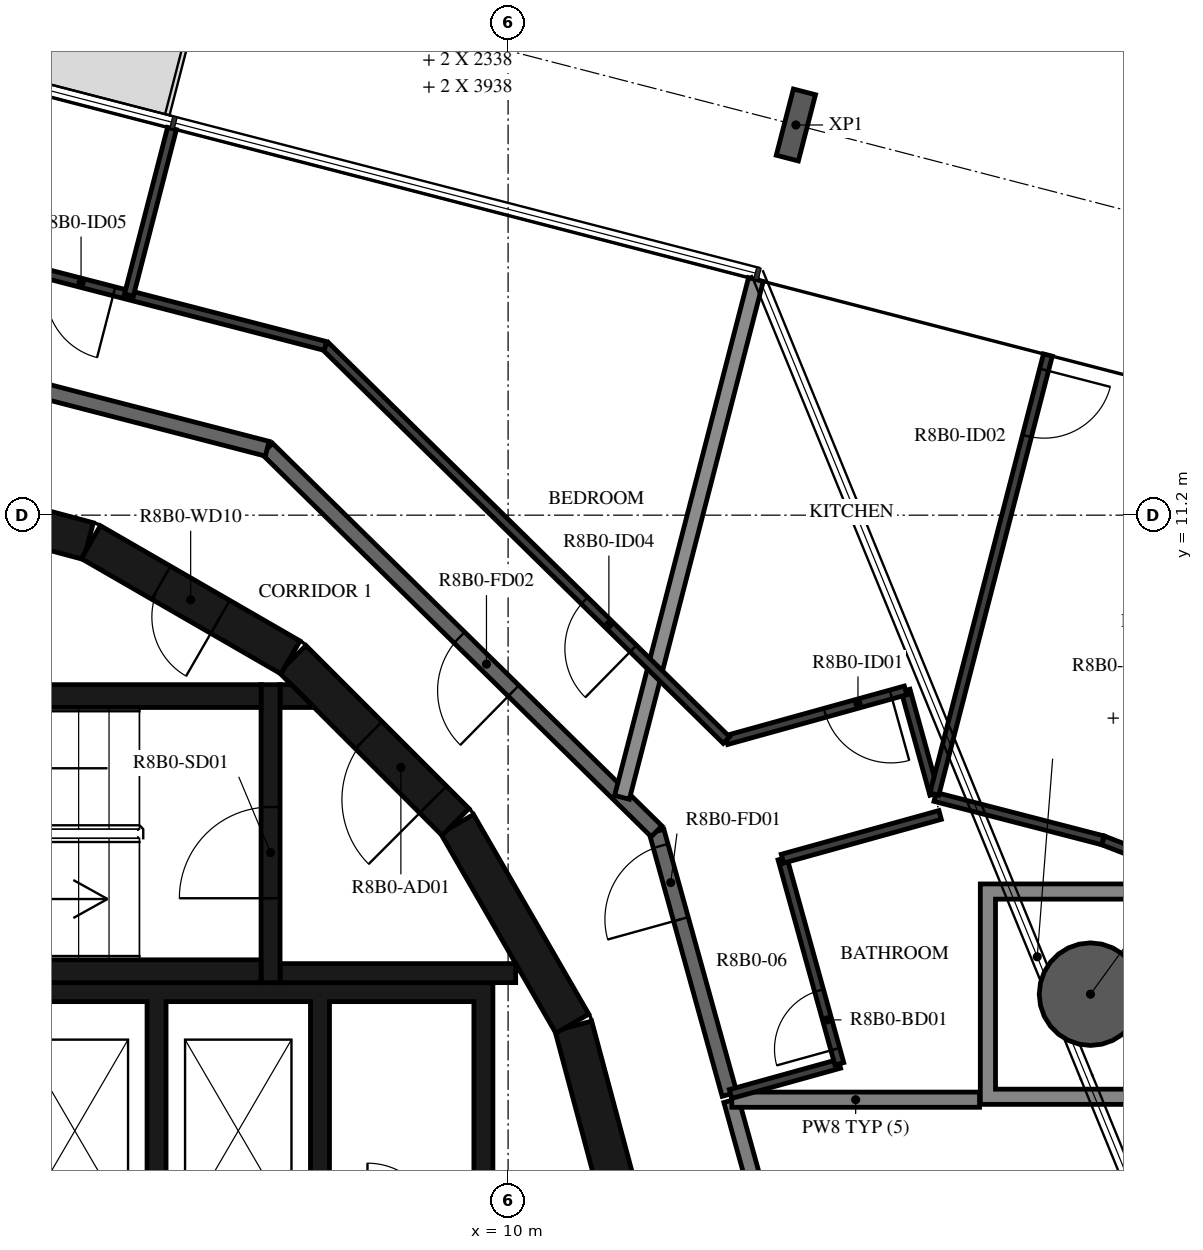
"""IFC4 building model, lengths in metres.
Left out: names, types, materials, properties, quantities, classifications, styles, units other than length and angle.
Written with IfcOpenShell. Run it as: python <this file> out.ifc"""

import sys

from ifc_helpers import new_model, si_unit, direction, frame, frame_2d, origin, origin_2d, place, context, subcontext, project, spatial, polyline, rectangle, hollow_circle, i_section, outline, extrude, element, fill, save


model = new_model("IFC4")
c1 = context("Model", 3, precision=1e-05, world=origin(), true_north=direction((0.0, 1.0)))
c2 = subcontext(c1, "Body", "Model", "MODEL_VIEW")
j1 = project(units=[si_unit("LENGTHUNIT", "METRE"), si_unit("PLANEANGLEUNIT", "RADIAN")], contexts=[c1])
p1 = place(None, origin())
s1 = spatial("IfcSite", under=j1, at=p1, CompositionType="ELEMENT")
p2 = place(p1, origin())
s2 = spatial("IfcBuilding", under=s1, at=p2, CompositionType="ELEMENT")
p3 = place(p2, frame((0.0, 0.0, 312.2)))
s3 = spatial("IfcBuildingStorey", under=s2, at=p3, CompositionType="ELEMENT", Elevation=312.2)
p4 = place(p3, frame((17.663, 4.898, -0.38), z_axis=(0.0, 0.0, 1.0), x_axis=(1.0, 0.0, 0.0)))
e1 = element("IfcColumn", 1, at=p4, inside=s3, PredefinedType="COLUMN", context=c2, shape_type="SweptSolid", body=[
    extrude(hollow_circle(Radius=0.675, WallThickness=0.03, at=origin_2d()), origin(), (0.0, 0.0, 1.0), 3.5),
])
p5 = place(p3, frame((13.786, 16.333, -0.38), z_axis=(0.0, 0.0, 1.0), x_axis=(0.968147663906, -0.250379913079, 0.0)))
e2 = element("IfcColumn", 2, at=p5, inside=s3, PredefinedType="COLUMN", context=c2, shape_type="SweptSolid", body=[
    extrude(i_section(OverallWidth=0.3, OverallDepth=0.9, WebThickness=0.019, FlangeThickness=0.035, FilletRadius=0.03, at=origin_2d()), origin(), (0.0, 0.0, 1.0), 3.5),
])
for number, where, z_axis, x_axis in (
    (3, (11.643, 1.55, 0.0), (0.0, 0.0, 1.0), (-0.259, 0.966, 0.0)),
    (4, (10.845, 4.51, 0.0), (0.0, 0.0, 1.0), (-0.5, 0.866, 0.0)),
):
    element("IfcWall", number, at=place(p3, frame(where, z_axis=z_axis, x_axis=x_axis)), inside=s3, PredefinedType="SHEAR", context=c2, shape_type="SweptSolid", body=[
        extrude(rectangle(XDim=3.033, YDim=0.5, at=frame_2d((1.516, 0.0))), origin(), (0.0, 0.0, 1.0), 3.12),
    ])
p6 = place(p3, frame((9.308, 7.164, 0.0), z_axis=(0.0, 0.0, 1.0), x_axis=(-0.707106781187, 0.707106781187, 0.0)))
e5 = element("IfcWall", 5, at=p6, inside=s3, PredefinedType="SHEAR", context=c2, shape_type="SweptSolid", body=[
    extrude(rectangle(XDim=3.032, YDim=0.5, at=frame_2d((1.516, 0.0))), origin(), (0.0, 0.0, 1.0), 3.12),
])
p7 = place(p6, frame((0.416, 0.0, 0.0)))
e6 = element("IfcOpeningElement", 6, at=p7, cuts=e5, PredefinedType="OPENING", context=c2, shape_type="SweptSolid", body=[
    extrude(rectangle(XDim=1.2, YDim=2.1, at=frame_2d((0.6, 1.05))), frame((0.0, 0.26, 0.0), z_axis=(0.0, -1.0, 0.0), x_axis=(1.0, 0.0, 0.0)), (0.0, 0.0, 1.0), 0.52),
])
p8 = place(p3, frame((7.137, 9.329, 0.0), z_axis=(0.0, 0.0, 1.0), x_axis=(-0.865975092491, 0.500087131594, 0.0)))
e7 = element("IfcWall", 7, at=p8, inside=s3, PredefinedType="SHEAR", context=c2, shape_type="SweptSolid", body=[
    extrude(rectangle(XDim=3.033, YDim=0.5, at=frame_2d((1.516, 0.0))), origin(), (0.0, 0.0, 1.0), 3.12),
])
p9 = place(p8, frame((1.066, 0.0, 0.0)))
e8 = element("IfcOpeningElement", 8, at=p9, cuts=e7, PredefinedType="OPENING", context=c2, shape_type="SweptSolid", body=[
    extrude(rectangle(XDim=0.9, YDim=2.1, at=frame_2d((0.45, 1.05))), frame((0.0, 0.26, 0.0), z_axis=(0.0, -1.0, 0.0), x_axis=(1.0, 0.0, 0.0)), (0.0, 0.0, 1.0), 0.52),
])
p10 = place(p3, frame((4.479, 10.858, 0.0), z_axis=(0.0, 0.0, 1.0), x_axis=(-0.965948410781, 0.258734743916, 0.0)))
e9 = element("IfcWall", 9, at=p10, inside=s3, PredefinedType="SHEAR", context=c2, shape_type="SweptSolid", body=[
    extrude(rectangle(XDim=3.033, YDim=0.5, at=frame_2d((1.516, 0.0))), origin(), (0.0, 0.0, 1.0), 3.12),
])
for number, where, z_axis, x_axis in (
    (10, (0.0, 5.2, 0.0), (0.0, 0.0, 1.0), (1.0, 0.0, 0.0)),
    (11, (0.0, 8.82, 0.0), (0.0, 0.0, 1.0), (1.0, 0.0, 0.0)),
):
    element("IfcWall", number, at=place(p3, frame(where, z_axis=z_axis, x_axis=x_axis)), inside=s3, PredefinedType="SHEAR", context=c2, shape_type="SweptSolid", body=[
        extrude(rectangle(XDim=6.75, YDim=0.3, at=frame_2d((3.375, 0.0))), origin(), (0.0, 0.0, 1.0), 3.12),
    ])
p11 = place(p3, frame((6.875, 5.05, 0.0), z_axis=(0.0, 0.0, 1.0), x_axis=(0.0, 1.0, 0.0)))
e12 = element("IfcWall", 12, at=p11, inside=s3, PredefinedType="SHEAR", context=c2, shape_type="SweptSolid", body=[
    extrude(rectangle(XDim=3.92, YDim=0.25, at=frame_2d((1.96, 0.0))), origin(), (0.0, 0.0, 1.0), 3.12),
])
p12 = place(p11, frame((1.11, 0.0, 0.0)))
e13 = element("IfcOpeningElement", 13, at=p12, cuts=e12, PredefinedType="OPENING", context=c2, shape_type="SweptSolid", body=[
    extrude(rectangle(XDim=1.2, YDim=2.1, at=frame_2d((0.6, 1.05))), frame((0.0, 0.135, 0.0), z_axis=(0.0, -1.0, 0.0), x_axis=(1.0, 0.0, 0.0)), (0.0, 0.0, 1.0), 0.27),
])
p13 = place(p3, frame((7.0, 5.175, 0.0), z_axis=(0.0, 0.0, 1.0), x_axis=(1.0, 0.0, 0.0)))
e14 = element("IfcWall", 14, at=p13, inside=s3, PredefinedType="SHEAR", context=c2, shape_type="SweptSolid", body=[
    extrude(rectangle(XDim=3.1, YDim=0.25, at=frame_2d((1.55, 0.0))), origin(), (0.0, 0.0, 1.0), 3.12),
])
p14 = place(p3, origin())
e15 = element("IfcWall", 15, at=p14, inside=s3, PredefinedType="SHEAR", context=c2, shape_type="SweptSolid", body=[
    extrude(outline(polyline([(7.448, 8.67), (7.0, 8.67), (7.0, 8.97), (7.148, 8.97), (7.448, 8.67)])), origin(), (0.0, 0.0, 1.0), 3.12),
])
p15 = place(p3, origin())
e16 = element("IfcWall", 16, at=p15, inside=s3, PredefinedType="SHEAR", context=c2, shape_type="SweptSolid", body=[
    extrude(outline(polyline([(-9.8, 1.9), (-9.55, 1.9), (-9.55, 4.8), (3.1, 4.8), (3.1, 1.9), (3.35, 1.9), (3.35, 4.8), (5.25, 4.8), (5.25, 1.9), (5.5, 1.9), (5.5, 4.8), (7.4, 4.8), (7.4, 1.9), (7.65, 1.9), (7.65, 4.8), (9.55, 4.8), (9.55, 1.9), (9.8, 1.9), (9.8, 4.8), (9.8, 5.05), (-9.8, 5.05), (-9.8, 4.8), (-9.8, 1.9)])), origin(), (0.0, 0.0, 1.0), 3.12),
])
p16 = place(p3, frame((13.872, 0.121, 0.0), z_axis=(0.0, 0.0, 1.0), x_axis=(-0.267291928416, 0.963615600228, 0.0)))
e17 = element("IfcWall", 17, at=p16, inside=s3, PredefinedType="STANDARD", context=c2, shape_type="SweptSolid", body=[
    extrude(rectangle(XDim=3.507, YDim=0.2, at=frame_2d((1.753, 0.0))), origin(), (0.0, 0.0, 1.0), 3.12),
])
p17 = place(p3, frame((12.913, 3.581, 0.0), z_axis=(0.0, 0.0, 1.0), x_axis=(-0.267223005422, 0.963634715737, 0.0)))
e18 = element("IfcWall", 18, at=p17, inside=s3, PredefinedType="STANDARD", context=c2, shape_type="SweptSolid", body=[
    extrude(rectangle(XDim=3.591, YDim=0.2, at=frame_2d((1.795, 0.0))), origin(), (0.0, 0.0, 1.0), 3.12),
])
p18 = place(p17, frame((2.39, 0.0, 0.0)))
e19 = element("IfcOpeningElement", 19, at=p18, cuts=e18, PredefinedType="OPENING", context=c2, shape_type="SweptSolid", body=[
    extrude(rectangle(XDim=1.0, YDim=2.1, at=frame_2d((0.5, 1.05))), frame((0.0, 0.11, 0.0), z_axis=(0.0, -1.0, 0.0), x_axis=(1.0, 0.0, 0.0)), (0.0, 0.0, 1.0), 0.22),
])
p19 = place(p3, frame((11.953, 7.041, 0.0), z_axis=(0.0, 0.0, 1.0), x_axis=(-0.713250549143, 0.70090916255, 0.0)))
e20 = element("IfcWall", 20, at=p19, inside=s3, PredefinedType="STANDARD", context=c2, shape_type="SweptSolid", body=[
    extrude(rectangle(XDim=7.181, YDim=0.2, at=frame_2d((3.59, 0.0))), origin(), (0.0, 0.0, 1.0), 3.12),
])
p20 = place(p19, frame((2.637, 0.0, 0.0)))
e21 = element("IfcOpeningElement", 21, at=p20, cuts=e20, PredefinedType="OPENING", context=c2, shape_type="SweptSolid", body=[
    extrude(rectangle(XDim=1.0, YDim=2.1, at=frame_2d((0.5, 1.05))), frame((0.0, 0.11, 0.0), z_axis=(0.0, -1.0, 0.0), x_axis=(1.0, 0.0, 0.0)), (0.0, 0.0, 1.0), 0.22),
])
p21 = place(p3, frame((6.831, 12.074, 0.0), z_axis=(0.0, 0.0, 1.0), x_axis=(-0.968144780225, 0.250391063186, 0.0)))
e22 = element("IfcWall", 22, at=p21, inside=s3, PredefinedType="STANDARD", context=c2, shape_type="SweptSolid", body=[
    extrude(rectangle(XDim=7.181, YDim=0.2, at=frame_2d((3.591, 0.0))), origin(), (0.0, 0.0, 1.0), 3.12),
])
p22 = place(p3, frame((16.203, 3.51, 0.0), z_axis=(0.0, 0.0, 1.0), x_axis=(-1.0, 0.0, 0.0)))
e23 = element("IfcWall", 23, at=p22, inside=s3, PredefinedType="STANDARD", context=c2, shape_type="SweptSolid", body=[
    extrude(rectangle(XDim=3.26, YDim=0.2, at=frame_2d((1.63, 0.0))), origin(), (0.0, 0.0, 1.0), 3.12),
])
p23 = place(p3, frame((13.26, 14.3, 0.0), z_axis=(0.0, 0.0, 1.0), x_axis=(-0.250397400042, -0.968143141303, 0.0)))
e24 = element("IfcWall", 24, at=p23, inside=s3, PredefinedType="STANDARD", context=c2, shape_type="SweptSolid", body=[
    extrude(rectangle(XDim=7.037, YDim=0.2, at=frame_2d((3.518, 0.0))), origin(), (0.0, 0.0, 1.0), 2.73),
])
p24 = place(p3, frame((12.927, 3.585, 0.0), z_axis=(0.0, 0.0, 1.0), x_axis=(0.963616756608, 0.26728775951, 0.0)))
e25 = element("IfcWall", 25, at=p24, inside=s3, PredefinedType="PARTITIONING", context=c2, shape_type="SweptSolid", body=[
    extrude(rectangle(XDim=1.485, YDim=0.12, at=frame_2d((0.743, 0.0))), origin(), (0.0, 0.0, 1.0), 3.12),
])
p25 = place(p3, frame((14.358, 3.982, 0.0), z_axis=(0.0, 0.0, 1.0), x_axis=(-0.267275166053, 0.963620249689, 0.0)))
e26 = element("IfcWall", 26, at=p25, inside=s3, PredefinedType="PARTITIONING", context=c2, shape_type="SweptSolid", body=[
    extrude(rectangle(XDim=2.801, YDim=0.12, at=frame_2d((1.4, 0.0))), origin(), (0.0, 0.0, 1.0), 3.12),
])
p26 = place(p25, frame((0.2, 0.0, 0.0)))
e27 = element("IfcOpeningElement", 27, at=p26, cuts=e26, PredefinedType="OPENING", context=c2, shape_type="SweptSolid", body=[
    extrude(rectangle(XDim=0.8, YDim=2.1, at=frame_2d((0.4, 1.05))), frame((0.0, 0.07, 0.0), z_axis=(0.0, -1.0, 0.0), x_axis=(1.0, 0.0, 0.0)), (0.0, 0.0, 1.0), 0.14),
])
p27 = place(p3, frame((13.61, 6.681, 0.0), z_axis=(0.0, 0.0, 1.0), x_axis=(0.963626714087, 0.267251858551, 0.0)))
e28 = element("IfcWall", 28, at=p27, inside=s3, PredefinedType="PARTITIONING", context=c2, shape_type="SweptSolid", body=[
    extrude(rectangle(XDim=2.152, YDim=0.12, at=frame_2d((1.076, 0.0))), origin(), (0.0, 0.0, 1.0), 3.12),
])
p28 = place(p3, frame((15.608, 7.53, 0.0), z_axis=(0.0, 0.0, 1.0), x_axis=(-0.267172351994, 0.963648760872, 0.0)))
e29 = element("IfcWall", 29, at=p28, inside=s3, PredefinedType="PARTITIONING", context=c2, shape_type="SweptSolid", body=[
    extrude(rectangle(XDim=1.416, YDim=0.12, at=frame_2d((0.708, 0.0))), origin(), (0.0, 0.0, 1.0), 3.12),
])
p29 = place(p3, frame((15.229, 8.894, 0.0), z_axis=(0.0, 0.0, 1.0), x_axis=(-0.96363793677, -0.267211389759, 0.0)))
e30 = element("IfcWall", 30, at=p29, inside=s3, PredefinedType="PARTITIONING", context=c2, shape_type="SweptSolid", body=[
    extrude(rectangle(XDim=2.446, YDim=0.12, at=frame_2d((1.223, 0.0))), origin(), (0.0, 0.0, 1.0), 3.12),
])
p30 = place(p29, frame((0.2, 0.0, 0.0)))
e31 = element("IfcOpeningElement", 31, at=p30, cuts=e30, PredefinedType="OPENING", context=c2, shape_type="SweptSolid", body=[
    extrude(rectangle(XDim=0.9, YDim=2.1, at=frame_2d((0.45, 1.05))), frame((0.0, 0.07, 0.0), z_axis=(0.0, -1.0, 0.0), x_axis=(1.0, 0.0, 0.0)), (0.0, 0.0, 1.0), 0.14),
])
p31 = place(p3, frame((12.873, 8.24, 0.0), z_axis=(0.0, 0.0, 1.0), x_axis=(-0.713251042219, 0.700908660792, 0.0)))
e32 = element("IfcWall", 32, at=p31, inside=s3, PredefinedType="PARTITIONING", context=c2, shape_type="SweptSolid", body=[
    extrude(rectangle(XDim=7.398, YDim=0.12, at=frame_2d((3.699, 0.0))), origin(), (0.0, 0.0, 1.0), 3.12),
])
p32 = place(p31, frame((1.718, 0.0, 0.0)))
e33 = element("IfcOpeningElement", 33, at=p32, cuts=e32, PredefinedType="OPENING", context=c2, shape_type="SweptSolid", body=[
    extrude(rectangle(XDim=0.9, YDim=2.1, at=frame_2d((0.45, 1.05))), frame((0.0, 0.07, 0.0), z_axis=(0.0, -1.0, 0.0), x_axis=(1.0, 0.0, 0.0)), (0.0, 0.0, 1.0), 0.14),
])
p33 = place(p3, frame((18.577, 6.631, 0.0), z_axis=(0.0, 0.0, 1.0), x_axis=(-0.932531937323, 0.361087504455, 0.0)))
e34 = element("IfcWall", 34, at=p33, inside=s3, PredefinedType="PARTITIONING", context=c2, shape_type="SweptSolid", body=[
    extrude(rectangle(XDim=0.807, YDim=0.12, at=frame_2d((0.403, 0.0))), origin(), (0.0, 0.0, 1.0), 3.12),
])
p34 = place(p3, frame((17.825, 6.922, 0.0), z_axis=(0.0, 0.0, 1.0), x_axis=(-0.968151834511, 0.250363785985, 0.0)))
e35 = element("IfcWall", 35, at=p34, inside=s3, PredefinedType="PARTITIONING", context=c2, shape_type="SweptSolid", body=[
    extrude(rectangle(XDim=2.28, YDim=0.12, at=frame_2d((1.14, 0.0))), origin(), (0.0, 0.0, 1.0), 3.12),
])
p35 = place(p3, frame((17.102, 13.307, 0.0), z_axis=(0.0, 0.0, 1.0), x_axis=(-0.250374225748, -0.968149134731, 0.0)))
e36 = element("IfcWall", 36, at=p35, inside=s3, PredefinedType="PARTITIONING", context=c2, shape_type="SweptSolid", body=[
    extrude(rectangle(XDim=5.967, YDim=0.12, at=frame_2d((2.983, 0.0))), origin(), (0.0, 0.0, 1.0), 3.12),
])
p36 = place(p35, frame((0.2, 0.0, 0.0)))
e37 = element("IfcOpeningElement", 37, at=p36, cuts=e36, PredefinedType="OPENING", context=c2, shape_type="SweptSolid", body=[
    extrude(rectangle(XDim=0.9, YDim=2.1, at=frame_2d((0.45, 1.05))), frame((0.0, 0.07, 0.0), z_axis=(0.0, -1.0, 0.0), x_axis=(1.0, 0.0, 0.0)), (0.0, 0.0, 1.0), 0.14),
])
p37 = place(p3, frame((7.596, 13.426, 0.0), z_axis=(0.0, 0.0, 1.0), x_axis=(-0.968146656033, 0.250383810203, 0.0)))
e38 = element("IfcWall", 38, at=p37, inside=s3, PredefinedType="PARTITIONING", context=c2, shape_type="SweptSolid", body=[
    extrude(rectangle(XDim=7.985, YDim=0.12, at=frame_2d((3.992, 0.0))), origin(), (0.0, 0.0, 1.0), 3.12),
])
p38 = place(p37, frame((2.87, 0.0, 0.0)))
e39 = element("IfcOpeningElement", 39, at=p38, cuts=e38, PredefinedType="OPENING", context=c2, shape_type="SweptSolid", body=[
    extrude(rectangle(XDim=0.9, YDim=2.1, at=frame_2d((0.45, 1.05))), frame((0.0, 0.07, 0.0), z_axis=(0.0, -1.0, 0.0), x_axis=(1.0, 0.0, 0.0)), (0.0, 0.0, 1.0), 0.14),
])
p39 = place(p3, frame((5.578, 16.287, 0.0), z_axis=(0.0, 0.0, 1.0), x_axis=(-0.250415921279, -0.968138350841, 0.0)))
e40 = element("IfcWall", 40, at=p39, inside=s3, PredefinedType="PARTITIONING", context=c2, shape_type="SweptSolid", body=[
    extrude(rectangle(XDim=2.265, YDim=0.12, at=frame_2d((1.132, 0.0))), origin(), (0.0, 0.0, 1.0), 2.73),
])
p40 = place(p3, origin())
e41 = element("IfcWall", 41, at=p40, inside=s3, PredefinedType="STANDARD", context=c2, shape_type="SweptSolid", body=[
    extrude(outline(polyline([(19.113, 6.348), (19.113, 3.448), (16.213, 3.448), (16.213, 6.348), (19.113, 6.348)]), holes=[polyline([(16.413, 3.648), (18.913, 3.648), (18.913, 6.148), (16.413, 6.148), (16.413, 3.648)])]), origin(), (0.0, 0.0, 1.0), 3.12),
])
p41 = place(p12, origin())
e42 = element("IfcDoor", 42, at=p41, inside=s3, OperationType="SINGLE_SWING_LEFT", PredefinedType="DOOR", context=c2, shape_type="SweptSolid", body=[
    extrude(rectangle(XDim=1.2, YDim=2.1, at=frame_2d((0.6, 1.05))), frame((0.0, 0.025, 0.0), z_axis=(0.0, -1.0, 0.0), x_axis=(1.0, 0.0, 0.0)), (0.0, 0.0, 1.0), 0.05),
])
fill(e13, e42)
p42 = place(p7, origin())
e43 = element("IfcDoor", 43, at=p42, inside=s3, OperationType="SINGLE_SWING_RIGHT", PredefinedType="DOOR", context=c2, shape_type="SweptSolid", body=[
    extrude(rectangle(XDim=1.2, YDim=2.1, at=frame_2d((0.6, 1.05))), frame((0.0, 0.025, 0.0), z_axis=(0.0, -1.0, 0.0), x_axis=(1.0, 0.0, 0.0)), (0.0, 0.0, 1.0), 0.05),
])
fill(e6, e43)
p43 = place(p9, origin())
e44 = element("IfcDoor", 44, at=p43, inside=s3, OperationType="SINGLE_SWING_RIGHT", PredefinedType="DOOR", context=c2, shape_type="SweptSolid", body=[
    extrude(rectangle(XDim=0.9, YDim=2.1, at=frame_2d((0.45, 1.05))), frame((0.0, 0.025, 0.0), z_axis=(0.0, -1.0, 0.0), x_axis=(1.0, 0.0, 0.0)), (0.0, 0.0, 1.0), 0.05),
])
fill(e8, e44)
p44 = place(p18, origin())
e45 = element("IfcDoor", 45, at=p44, inside=s3, OperationType="SINGLE_SWING_LEFT", PredefinedType="DOOR", context=c2, shape_type="SweptSolid", body=[
    extrude(rectangle(XDim=1.0, YDim=2.1, at=frame_2d((0.5, 1.05))), frame((0.0, 0.025, 0.0), z_axis=(0.0, -1.0, 0.0), x_axis=(1.0, 0.0, 0.0)), (0.0, 0.0, 1.0), 0.05),
])
fill(e19, e45)
p45 = place(p26, origin())
e46 = element("IfcDoor", 46, at=p45, inside=s3, OperationType="SINGLE_SWING_LEFT", PredefinedType="DOOR", context=c2, shape_type="SweptSolid", body=[
    extrude(rectangle(XDim=0.8, YDim=2.1, at=frame_2d((0.4, 1.05))), frame((0.0, 0.025, 0.0), z_axis=(0.0, -1.0, 0.0), x_axis=(1.0, 0.0, 0.0)), (0.0, 0.0, 1.0), 0.05),
])
fill(e27, e46)
p46 = place(p30, origin())
e47 = element("IfcDoor", 47, at=p46, inside=s3, OperationType="SINGLE_SWING_LEFT", PredefinedType="DOOR", context=c2, shape_type="SweptSolid", body=[
    extrude(rectangle(XDim=0.9, YDim=2.1, at=frame_2d((0.45, 1.05))), frame((0.0, 0.025, 0.0), z_axis=(0.0, -1.0, 0.0), x_axis=(1.0, 0.0, 0.0)), (0.0, 0.0, 1.0), 0.05),
])
fill(e31, e47)
p47 = place(p36, origin())
e48 = element("IfcDoor", 48, at=p47, inside=s3, OperationType="SINGLE_SWING_LEFT", PredefinedType="DOOR", context=c2, shape_type="SweptSolid", body=[
    extrude(rectangle(XDim=0.9, YDim=2.1, at=frame_2d((0.45, 1.05))), frame((0.0, 0.025, 0.0), z_axis=(0.0, -1.0, 0.0), x_axis=(1.0, 0.0, 0.0)), (0.0, 0.0, 1.0), 0.05),
])
fill(e37, e48)
p48 = place(p20, origin())
e49 = element("IfcDoor", 49, at=p48, inside=s3, OperationType="SINGLE_SWING_LEFT", PredefinedType="DOOR", context=c2, shape_type="SweptSolid", body=[
    extrude(rectangle(XDim=1.0, YDim=2.1, at=frame_2d((0.5, 1.05))), frame((0.0, 0.025, 0.0), z_axis=(0.0, -1.0, 0.0), x_axis=(1.0, 0.0, 0.0)), (0.0, 0.0, 1.0), 0.05),
])
fill(e21, e49)
p49 = place(p32, origin())
e50 = element("IfcDoor", 50, at=p49, inside=s3, OperationType="SINGLE_SWING_LEFT", PredefinedType="DOOR", context=c2, shape_type="SweptSolid", body=[
    extrude(rectangle(XDim=0.9, YDim=2.1, at=frame_2d((0.45, 1.05))), frame((0.0, 0.025, 0.0), z_axis=(0.0, -1.0, 0.0), x_axis=(1.0, 0.0, 0.0)), (0.0, 0.0, 1.0), 0.05),
])
fill(e33, e50)
p50 = place(p38, origin())
e51 = element("IfcDoor", 51, at=p50, inside=s3, OperationType="SINGLE_SWING_LEFT", PredefinedType="DOOR", context=c2, shape_type="SweptSolid", body=[
    extrude(rectangle(XDim=0.9, YDim=2.1, at=frame_2d((0.45, 1.05))), frame((0.0, 0.025, 0.0), z_axis=(0.0, -1.0, 0.0), x_axis=(1.0, 0.0, 0.0)), (0.0, 0.0, 1.0), 0.05),
])
fill(e39, e51)
save(model, sys.argv[1])
